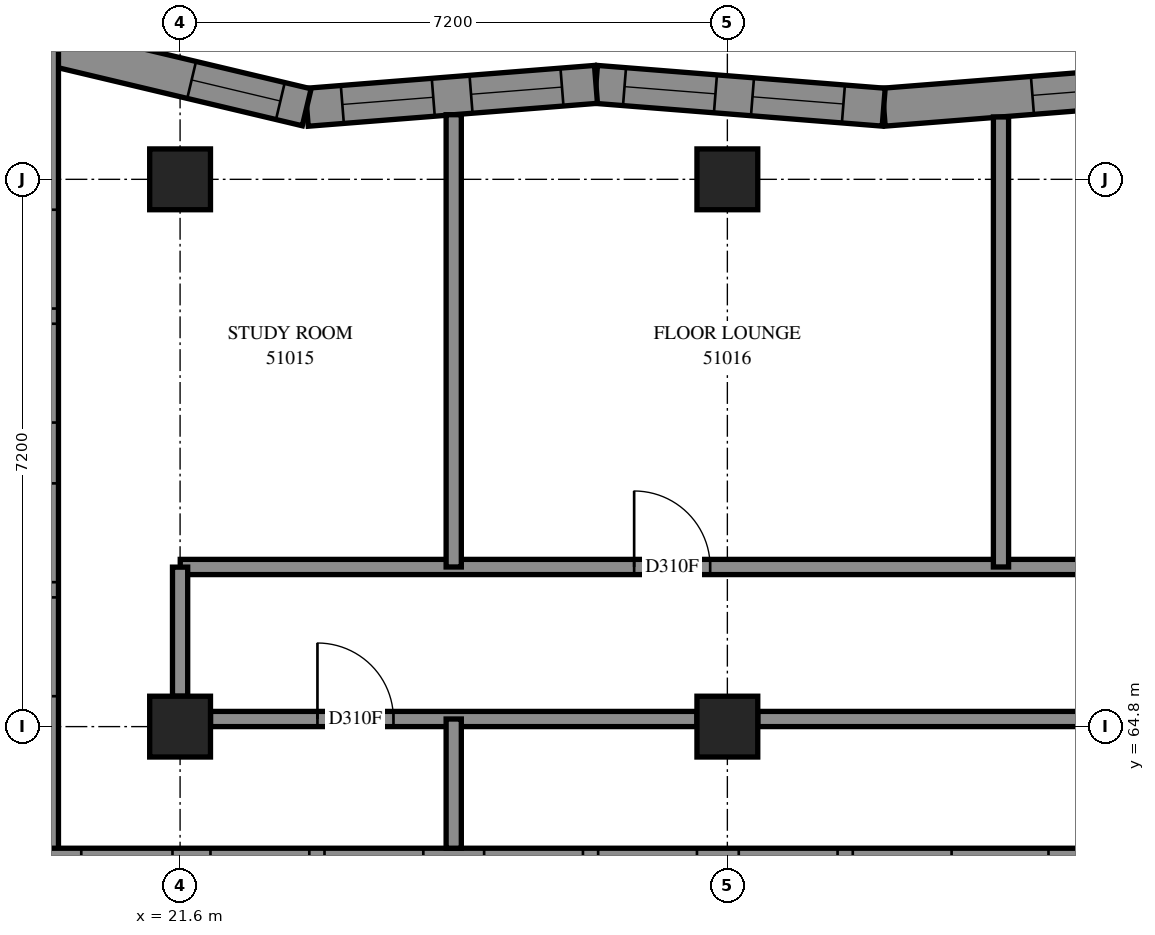
"""IFC4 building model, lengths in metres.
Left out: names, types, materials, properties, quantities, classifications, styles, units other than length and angle.
Written with IfcOpenShell. Run it as: python <this file> out.ifc"""

import sys

from ifc_helpers import new_model, si_unit, direction, frame, frame_2d, origin, origin_2d, place, context, subcontext, project, spatial, polyline, rectangle, outline, extrude, element, fill, save


model = new_model("IFC4")
c1 = context("Model", 3, precision=1e-05, world=origin(), true_north=direction((0.0, 1.0)))
c2 = subcontext(c1, "Body", "Model", "MODEL_VIEW")
j1 = project(units=[si_unit("LENGTHUNIT", "METRE"), si_unit("PLANEANGLEUNIT", "RADIAN")], contexts=[c1])
p1 = place(None, origin())
s1 = spatial("IfcSite", under=j1, at=p1, CompositionType="ELEMENT")
p2 = place(p1, origin())
s2 = spatial("IfcBuilding", under=s1, at=p2, CompositionType="ELEMENT")
p3 = place(p2, frame((0.0, 0.0, 189.6)))
s3 = spatial("IfcBuildingStorey", under=s2, at=p3, CompositionType="ELEMENT", Elevation=189.6)
for number, where, z_axis, x_axis in (
    (1, (21.6, 64.8, 0.0), (0.0, 0.0, 1.0), (1.0, 0.0, 0.0)),
    (2, (21.6, 72.0, 0.0), (0.0, 0.0, 1.0), (1.0, 0.0, 0.0)),
    (3, (28.8, 64.8, 0.0), (0.0, 0.0, 1.0), (1.0, 0.0, 0.0)),
    (4, (28.8, 72.0, 0.0), (0.0, 0.0, 1.0), (1.0, 0.0, 0.0)),
):
    element("IfcColumn", number, at=place(p3, frame(where, z_axis=z_axis, x_axis=x_axis)), inside=s3, PredefinedType="COLUMN", context=c2, shape_type="SweptSolid", body=[
        extrude(rectangle(XDim=0.8, YDim=0.8, at=origin_2d()), origin(), (0.0, 0.0, 1.0), 3.1),
    ])
p4 = place(p3, frame((34.642, 73.249, 0.0), z_axis=(0.0, 0.0, 1.0), x_axis=(-0.9968746163, -0.078999996, 0.0)))
e5 = element("IfcWall", 5, at=p4, inside=s3, PredefinedType="SOLIDWALL", context=c2, shape_type="SweptSolid", body=[
    extrude(outline(polyline([(-0.02, -0.25), (3.778, -0.25), (3.817, 0.25), (0.02, 0.25), (-0.02, -0.25)])), origin(), (0.0, 0.0, 1.0), 3.1),
])
p5 = place(p4, frame((0.635, 0.0, 0.45)))
e6 = element("IfcOpeningElement", 6, at=p5, cuts=e5, PredefinedType="OPENING", context=c2, shape_type="SweptSolid", body=[
    extrude(rectangle(XDim=1.2, YDim=2.5, at=frame_2d((0.6, 1.25))), frame((0.0, 0.26, 0.0), z_axis=(0.0, -1.0, 0.0), x_axis=(1.0, 0.0, 0.0)), (0.0, 0.0, 1.0), 0.52),
])
p6 = place(p3, frame((30.857, 72.949, 0.0), z_axis=(0.0, 0.0, 1.0), x_axis=(-0.9968747806, 0.0789979222, 0.0)))
e7 = element("IfcWall", 7, at=p6, inside=s3, PredefinedType="SOLIDWALL", context=c2, shape_type="SweptSolid", body=[
    extrude(outline(polyline([(0.02, -0.25), (3.817, -0.25), (3.778, 0.25), (-0.02, 0.25), (0.02, -0.25)])), origin(), (0.0, 0.0, 1.0), 3.1),
])
p7 = place(p6, frame((0.532, 0.0, 0.45)))
e8 = element("IfcOpeningElement", 8, at=p7, cuts=e7, PredefinedType="OPENING", context=c2, shape_type="SweptSolid", body=[
    extrude(rectangle(XDim=1.2, YDim=2.5, at=frame_2d((0.6, 1.25))), frame((0.0, 0.26, 0.0), z_axis=(0.0, -1.0, 0.0), x_axis=(1.0, 0.0, 0.0)), (0.0, 0.0, 1.0), 0.52),
])
p8 = place(p6, frame((2.22, 0.0, 0.45)))
e9 = element("IfcOpeningElement", 9, at=p8, cuts=e7, PredefinedType="OPENING", context=c2, shape_type="SweptSolid", body=[
    extrude(rectangle(XDim=1.2, YDim=2.5, at=frame_2d((0.6, 1.25))), frame((0.0, 0.26, 0.0), z_axis=(0.0, -1.0, 0.0), x_axis=(1.0, 0.0, 0.0)), (0.0, 0.0, 1.0), 0.52),
])
p9 = place(p3, frame((27.071, 73.249, 0.0), z_axis=(0.0, 0.0, 1.0), x_axis=(-0.9968755515, -0.0789881945, 0.0)))
e10 = element("IfcWall", 10, at=p9, inside=s3, PredefinedType="SOLIDWALL", context=c2, shape_type="SweptSolid", body=[
    extrude(outline(polyline([(-0.02, -0.25), (3.778, -0.25), (3.856, 0.25), (0.02, 0.25), (-0.02, -0.25)])), origin(), (0.0, 0.0, 1.0), 3.1),
])
p10 = place(p9, frame((0.449, 0.0, 0.45)))
e11 = element("IfcOpeningElement", 11, at=p10, cuts=e10, PredefinedType="OPENING", context=c2, shape_type="SweptSolid", body=[
    extrude(rectangle(XDim=1.2, YDim=2.5, at=frame_2d((0.6, 1.25))), frame((0.0, 0.26, 0.0), z_axis=(0.0, -1.0, 0.0), x_axis=(1.0, 0.0, 0.0)), (0.0, 0.0, 1.0), 0.52),
])
p11 = place(p9, frame((2.147, 0.0, 0.45)))
e12 = element("IfcOpeningElement", 12, at=p11, cuts=e10, PredefinedType="OPENING", context=c2, shape_type="SweptSolid", body=[
    extrude(rectangle(XDim=1.2, YDim=2.5, at=frame_2d((0.6, 1.25))), frame((0.0, 0.26, 0.0), z_axis=(0.0, -1.0, 0.0), x_axis=(1.0, 0.0, 0.0)), (0.0, 0.0, 1.0), 0.52),
])
p12 = place(p3, frame((23.266, 72.948, 0.0), z_axis=(0.0, 0.0, 1.0), x_axis=(-0.9728851289, 0.2312888368, 0.0)))
e13 = element("IfcWall", 13, at=p12, inside=s3, PredefinedType="SOLIDWALL", context=c2, shape_type="SweptSolid", body=[
    extrude(outline(polyline([(0.039, -0.25), (3.93, -0.25), (3.298, 0.25), (-0.039, 0.25), (0.039, -0.25)])), origin(), (0.0, 0.0, 1.0), 3.1),
])
p13 = place(p12, frame((0.356, 0.0, 0.45)))
e14 = element("IfcOpeningElement", 14, at=p13, cuts=e13, PredefinedType="OPENING", context=c2, shape_type="SweptSolid", body=[
    extrude(rectangle(XDim=1.2, YDim=2.5, at=frame_2d((0.6, 1.25))), frame((0.0, 0.26, 0.0), z_axis=(0.0, -1.0, 0.0), x_axis=(1.0, 0.0, 0.0)), (0.0, 0.0, 1.0), 0.52),
])
p14 = place(p3, frame((19.75, 73.784, 0.0), z_axis=(0.0, 0.0, 1.0), x_axis=(0.0, -1.0, 0.0)))
e15 = element("IfcWall", 15, at=p14, inside=s3, PredefinedType="SOLIDWALL", context=c2, shape_type="SweptSolid", body=[
    extrude(outline(polyline([(-0.316, -0.25), (11.084, -0.25), (10.584, 0.25), (0.316, 0.25), (-0.316, -0.25)])), origin(), (0.0, 0.0, 1.0), 3.1),
])
p15 = place(p14, frame((2.184, 0.0, 0.45)))
e16 = element("IfcOpeningElement", 16, at=p15, cuts=e15, PredefinedType="OPENING", context=c2, shape_type="SweptSolid", body=[
    extrude(rectangle(XDim=1.3, YDim=2.5, at=frame_2d((0.65, 1.25))), frame((0.0, 0.26, 0.0), z_axis=(0.0, -1.0, 0.0), x_axis=(1.0, 0.0, 0.0)), (0.0, 0.0, 1.0), 0.52),
])
p16 = place(p14, frame((3.684, 0.0, 0.45)))
e17 = element("IfcOpeningElement", 17, at=p16, cuts=e15, PredefinedType="OPENING", context=c2, shape_type="SweptSolid", body=[
    extrude(rectangle(XDim=1.3, YDim=2.5, at=frame_2d((0.65, 1.25))), frame((0.0, 0.26, 0.0), z_axis=(0.0, -1.0, 0.0), x_axis=(1.0, 0.0, 0.0)), (0.0, 0.0, 1.0), 0.52),
])
p17 = place(p14, frame((5.784, 0.0, 0.45)))
e18 = element("IfcOpeningElement", 18, at=p17, cuts=e15, PredefinedType="OPENING", context=c2, shape_type="SweptSolid", body=[
    extrude(rectangle(XDim=1.3, YDim=2.5, at=frame_2d((0.65, 1.25))), frame((0.0, 0.26, 0.0), z_axis=(0.0, -1.0, 0.0), x_axis=(1.0, 0.0, 0.0)), (0.0, 0.0, 1.0), 0.52),
])
p18 = place(p14, frame((7.284, 0.0, 0.45)))
e19 = element("IfcOpeningElement", 19, at=p18, cuts=e15, PredefinedType="OPENING", context=c2, shape_type="SweptSolid", body=[
    extrude(rectangle(XDim=1.3, YDim=2.5, at=frame_2d((0.65, 1.25))), frame((0.0, 0.26, 0.0), z_axis=(0.0, -1.0, 0.0), x_axis=(1.0, 0.0, 0.0)), (0.0, 0.0, 1.0), 0.52),
])
p19 = place(p3, frame((19.75, 62.95, 0.0), z_axis=(0.0, 0.0, 1.0), x_axis=(1.0, 0.0, 0.0)))
e20 = element("IfcWall", 20, at=p19, inside=s3, PredefinedType="SOLIDWALL", context=c2, shape_type="SweptSolid", body=[
    extrude(outline(polyline([(-0.25, -0.25), (15.05, -0.25), (15.55, 0.25), (0.25, 0.25), (-0.25, -0.25)])), origin(), (0.0, 0.0, 1.0), 3.1),
])
p20 = place(p19, frame((2.25, 0.0, 0.45)))
e21 = element("IfcOpeningElement", 21, at=p20, cuts=e20, PredefinedType="OPENING", context=c2, shape_type="SweptSolid", body=[
    extrude(rectangle(XDim=1.3, YDim=2.5, at=frame_2d((0.65, 1.25))), frame((0.0, 0.26, 0.0), z_axis=(0.0, -1.0, 0.0), x_axis=(1.0, 0.0, 0.0)), (0.0, 0.0, 1.0), 0.52),
])
p21 = place(p19, frame((3.75, 0.0, 0.45)))
e22 = element("IfcOpeningElement", 22, at=p21, cuts=e20, PredefinedType="OPENING", context=c2, shape_type="SweptSolid", body=[
    extrude(rectangle(XDim=1.3, YDim=2.5, at=frame_2d((0.65, 1.25))), frame((0.0, 0.26, 0.0), z_axis=(0.0, -1.0, 0.0), x_axis=(1.0, 0.0, 0.0)), (0.0, 0.0, 1.0), 0.52),
])
p22 = place(p19, frame((5.85, 0.0, 0.45)))
e23 = element("IfcOpeningElement", 23, at=p22, cuts=e20, PredefinedType="OPENING", context=c2, shape_type="SweptSolid", body=[
    extrude(rectangle(XDim=1.3, YDim=2.5, at=frame_2d((0.65, 1.25))), frame((0.0, 0.26, 0.0), z_axis=(0.0, -1.0, 0.0), x_axis=(1.0, 0.0, 0.0)), (0.0, 0.0, 1.0), 0.52),
])
p23 = place(p19, frame((7.35, 0.0, 0.45)))
e24 = element("IfcOpeningElement", 24, at=p23, cuts=e20, PredefinedType="OPENING", context=c2, shape_type="SweptSolid", body=[
    extrude(rectangle(XDim=1.3, YDim=2.5, at=frame_2d((0.65, 1.25))), frame((0.0, 0.26, 0.0), z_axis=(0.0, -1.0, 0.0), x_axis=(1.0, 0.0, 0.0)), (0.0, 0.0, 1.0), 0.52),
])
p24 = place(p19, frame((9.2, 0.0, 0.45)))
e25 = element("IfcOpeningElement", 25, at=p24, cuts=e20, PredefinedType="OPENING", context=c2, shape_type="SweptSolid", body=[
    extrude(rectangle(XDim=1.3, YDim=2.5, at=frame_2d((0.65, 1.25))), frame((0.0, 0.26, 0.0), z_axis=(0.0, -1.0, 0.0), x_axis=(1.0, 0.0, 0.0)), (0.0, 0.0, 1.0), 0.52),
])
p25 = place(p19, frame((10.7, 0.0, 0.45)))
e26 = element("IfcOpeningElement", 26, at=p25, cuts=e20, PredefinedType="OPENING", context=c2, shape_type="SweptSolid", body=[
    extrude(rectangle(XDim=1.3, YDim=2.5, at=frame_2d((0.65, 1.25))), frame((0.0, 0.26, 0.0), z_axis=(0.0, -1.0, 0.0), x_axis=(1.0, 0.0, 0.0)), (0.0, 0.0, 1.0), 0.52),
])
p26 = place(p19, frame((0.55, 0.0, 0.45)))
e27 = element("IfcOpeningElement", 27, at=p26, cuts=e20, PredefinedType="OPENING", context=c2, shape_type="SweptSolid", body=[
    extrude(rectangle(XDim=1.2, YDim=2.5, at=frame_2d((0.6, 1.25))), frame((0.0, 0.26, 0.0), z_axis=(0.0, -1.0, 0.0), x_axis=(1.0, 0.0, 0.0)), (0.0, 0.0, 1.0), 0.52),
])
p27 = place(p19, frame((13.275, 0.0, 0.45)))
e28 = element("IfcOpeningElement", 28, at=p27, cuts=e20, PredefinedType="OPENING", context=c2, shape_type="SweptSolid", body=[
    extrude(rectangle(XDim=1.2, YDim=2.5, at=frame_2d((0.6, 1.25))), frame((0.0, 0.26, 0.0), z_axis=(0.0, -1.0, 0.0), x_axis=(1.0, 0.0, 0.0)), (0.0, 0.0, 1.0), 0.52),
])
p28 = place(p3, frame((21.602, 66.9, 0.0), z_axis=(0.0, 0.0, 1.0), x_axis=(1.0, 0.0, 0.0)))
e29 = element("IfcWall", 29, at=p28, inside=s3, PredefinedType="PARTITIONING", context=c2, shape_type="SweptSolid", body=[
    extrude(rectangle(XDim=18.998, YDim=0.2, at=frame_2d((9.499, 0.0))), origin(), (0.0, 0.0, 1.0), 3.1),
])
p29 = place(p28, frame((5.972, 0.0, 0.0)))
e30 = element("IfcOpeningElement", 30, at=p29, cuts=e29, PredefinedType="OPENING", context=c2, shape_type="SweptSolid", body=[
    extrude(rectangle(XDim=1.0, YDim=2.1, at=frame_2d((0.5, 1.05))), frame((0.0, 0.11, 0.0), z_axis=(0.0, -1.0, 0.0), x_axis=(1.0, 0.0, 0.0)), (0.0, 0.0, 1.0), 0.22),
])
p30 = place(p28, frame((13.172, 0.0, 0.0)))
e31 = element("IfcOpeningElement", 31, at=p30, cuts=e29, PredefinedType="OPENING", context=c2, shape_type="SweptSolid", body=[
    extrude(rectangle(XDim=1.0, YDim=2.1, at=frame_2d((0.5, 1.05))), frame((0.0, 0.11, 0.0), z_axis=(0.0, -1.0, 0.0), x_axis=(1.0, 0.0, 0.0)), (0.0, 0.0, 1.0), 0.22),
])
p31 = place(p3, frame((29.2, 64.9, 0.0), z_axis=(0.0, 0.0, 1.0), x_axis=(1.0, 0.0, 0.0)))
e32 = element("IfcWall", 32, at=p31, inside=s3, PredefinedType="PARTITIONING", context=c2, shape_type="SweptSolid", body=[
    extrude(rectangle(XDim=6.4, YDim=0.2, at=frame_2d((3.2, 0.0))), origin(), (0.0, 0.0, 1.0), 2.6),
])
p32 = place(p3, frame((22.0, 64.9, 0.0), z_axis=(0.0, 0.0, 1.0), x_axis=(1.0, 0.0, 0.0)))
e33 = element("IfcWall", 33, at=p32, inside=s3, PredefinedType="PARTITIONING", context=c2, shape_type="SweptSolid", body=[
    extrude(rectangle(XDim=6.4, YDim=0.2, at=frame_2d((3.2, 0.0))), origin(), (0.0, 0.0, 1.0), 2.6),
])
p33 = place(p32, frame((1.407, 0.0, 0.0)))
e34 = element("IfcOpeningElement", 34, at=p33, cuts=e33, PredefinedType="OPENING", context=c2, shape_type="SweptSolid", body=[
    extrude(rectangle(XDim=1.0, YDim=2.1, at=frame_2d((0.5, 1.05))), frame((0.0, 0.11, 0.0), z_axis=(0.0, -1.0, 0.0), x_axis=(1.0, 0.0, 0.0)), (0.0, 0.0, 1.0), 0.22),
])
p34 = place(p3, frame((25.2, 66.9, 0.0), z_axis=(0.0, 0.0, 1.0), x_axis=(0.0, 1.0, 0.0)))
e35 = element("IfcWall", 35, at=p34, inside=s3, PredefinedType="PARTITIONING", context=c2, shape_type="SweptSolid", body=[
    extrude(rectangle(XDim=5.95, YDim=0.2, at=frame_2d((2.975, 0.0))), origin(), (0.0, 0.0, 1.0), 3.1),
])
p35 = place(p3, frame((32.4, 66.9, 0.0), z_axis=(0.0, 0.0, 1.0), x_axis=(0.0, 1.0, 0.0)))
e36 = element("IfcWall", 36, at=p35, inside=s3, PredefinedType="PARTITIONING", context=c2, shape_type="SweptSolid", body=[
    extrude(rectangle(XDim=5.921, YDim=0.2, at=frame_2d((2.96, 0.0))), origin(), (0.0, 0.0, 1.0), 3.1),
])
p36 = place(p3, frame((21.6, 65.2, 0.0), z_axis=(0.0, 0.0, 1.0), x_axis=(0.0, 1.0, 0.0)))
e37 = element("IfcWall", 37, at=p36, inside=s3, PredefinedType="PARTITIONING", context=c2, shape_type="SweptSolid", body=[
    extrude(rectangle(XDim=1.698, YDim=0.2, at=frame_2d((0.849, 0.0))), origin(), (0.0, 0.0, 1.0), 2.6),
])
p37 = place(p3, frame((25.2, 63.2, 0.0), z_axis=(0.0, 0.0, 1.0), x_axis=(0.0, 1.0, 0.0)))
e38 = element("IfcWall", 38, at=p37, inside=s3, PredefinedType="PARTITIONING", context=c2, shape_type="SweptSolid", body=[
    extrude(rectangle(XDim=1.7, YDim=0.2, at=frame_2d((0.85, 0.0))), origin(), (0.0, 0.0, 1.0), 3.1),
])
p38 = place(p5, origin())
e39 = element("IfcWindow", 39, at=p38, inside=s3, PartitioningType="SINGLE_PANEL", PredefinedType="WINDOW", context=c2, shape_type="SweptSolid", body=[
    extrude(rectangle(XDim=1.2, YDim=2.5, at=frame_2d((0.6, 1.25))), frame((0.0, 0.18, 0.0), z_axis=(0.0, -1.0, 0.0), x_axis=(1.0, 0.0, 0.0)), (0.0, 0.0, 1.0), 0.06),
])
fill(e6, e39)
p39 = place(p7, origin())
e40 = element("IfcWindow", 40, at=p39, inside=s3, PartitioningType="SINGLE_PANEL", PredefinedType="WINDOW", context=c2, shape_type="SweptSolid", body=[
    extrude(rectangle(XDim=1.2, YDim=2.5, at=frame_2d((0.6, 1.25))), frame((0.0, 0.18, 0.0), z_axis=(0.0, -1.0, 0.0), x_axis=(1.0, 0.0, 0.0)), (0.0, 0.0, 1.0), 0.06),
])
fill(e8, e40)
p40 = place(p8, origin())
e41 = element("IfcWindow", 41, at=p40, inside=s3, PartitioningType="SINGLE_PANEL", PredefinedType="WINDOW", context=c2, shape_type="SweptSolid", body=[
    extrude(rectangle(XDim=1.2, YDim=2.5, at=frame_2d((0.6, 1.25))), frame((0.0, 0.18, 0.0), z_axis=(0.0, -1.0, 0.0), x_axis=(1.0, 0.0, 0.0)), (0.0, 0.0, 1.0), 0.06),
])
fill(e9, e41)
p41 = place(p10, origin())
e42 = element("IfcWindow", 42, at=p41, inside=s3, PartitioningType="SINGLE_PANEL", PredefinedType="WINDOW", context=c2, shape_type="SweptSolid", body=[
    extrude(rectangle(XDim=1.2, YDim=2.5, at=frame_2d((0.6, 1.25))), frame((0.0, 0.18, 0.0), z_axis=(0.0, -1.0, 0.0), x_axis=(1.0, 0.0, 0.0)), (0.0, 0.0, 1.0), 0.06),
])
fill(e11, e42)
p42 = place(p11, origin())
e43 = element("IfcWindow", 43, at=p42, inside=s3, PartitioningType="SINGLE_PANEL", PredefinedType="WINDOW", context=c2, shape_type="SweptSolid", body=[
    extrude(rectangle(XDim=1.2, YDim=2.5, at=frame_2d((0.6, 1.25))), frame((0.0, 0.18, 0.0), z_axis=(0.0, -1.0, 0.0), x_axis=(1.0, 0.0, 0.0)), (0.0, 0.0, 1.0), 0.06),
])
fill(e12, e43)
p43 = place(p13, origin())
e44 = element("IfcWindow", 44, at=p43, inside=s3, PartitioningType="SINGLE_PANEL", PredefinedType="WINDOW", context=c2, shape_type="SweptSolid", body=[
    extrude(rectangle(XDim=1.2, YDim=2.5, at=frame_2d((0.6, 1.25))), frame((0.0, 0.18, 0.0), z_axis=(0.0, -1.0, 0.0), x_axis=(1.0, 0.0, 0.0)), (0.0, 0.0, 1.0), 0.06),
])
fill(e14, e44)
p44 = place(p15, origin())
e45 = element("IfcWindow", 45, at=p44, inside=s3, PartitioningType="SINGLE_PANEL", PredefinedType="WINDOW", context=c2, shape_type="SweptSolid", body=[
    extrude(rectangle(XDim=1.3, YDim=2.5, at=frame_2d((0.65, 1.25))), frame((0.0, 0.18, 0.0), z_axis=(0.0, -1.0, 0.0), x_axis=(1.0, 0.0, 0.0)), (0.0, 0.0, 1.0), 0.06),
])
fill(e16, e45)
p45 = place(p16, origin())
e46 = element("IfcWindow", 46, at=p45, inside=s3, PartitioningType="SINGLE_PANEL", PredefinedType="WINDOW", context=c2, shape_type="SweptSolid", body=[
    extrude(rectangle(XDim=1.3, YDim=2.5, at=frame_2d((0.65, 1.25))), frame((0.0, 0.18, 0.0), z_axis=(0.0, -1.0, 0.0), x_axis=(1.0, 0.0, 0.0)), (0.0, 0.0, 1.0), 0.06),
])
fill(e17, e46)
p46 = place(p17, origin())
e47 = element("IfcWindow", 47, at=p46, inside=s3, PartitioningType="SINGLE_PANEL", PredefinedType="WINDOW", context=c2, shape_type="SweptSolid", body=[
    extrude(rectangle(XDim=1.3, YDim=2.5, at=frame_2d((0.65, 1.25))), frame((0.0, 0.18, 0.0), z_axis=(0.0, -1.0, 0.0), x_axis=(1.0, 0.0, 0.0)), (0.0, 0.0, 1.0), 0.06),
])
fill(e18, e47)
p47 = place(p18, origin())
e48 = element("IfcWindow", 48, at=p47, inside=s3, PartitioningType="SINGLE_PANEL", PredefinedType="WINDOW", context=c2, shape_type="SweptSolid", body=[
    extrude(rectangle(XDim=1.3, YDim=2.5, at=frame_2d((0.65, 1.25))), frame((0.0, 0.18, 0.0), z_axis=(0.0, -1.0, 0.0), x_axis=(1.0, 0.0, 0.0)), (0.0, 0.0, 1.0), 0.06),
])
fill(e19, e48)
p48 = place(p20, origin())
e49 = element("IfcWindow", 49, at=p48, inside=s3, PartitioningType="SINGLE_PANEL", PredefinedType="WINDOW", context=c2, shape_type="SweptSolid", body=[
    extrude(rectangle(XDim=1.3, YDim=2.5, at=frame_2d((0.65, 1.25))), frame((0.0, 0.18, 0.0), z_axis=(0.0, -1.0, 0.0), x_axis=(1.0, 0.0, 0.0)), (0.0, 0.0, 1.0), 0.06),
])
fill(e21, e49)
p49 = place(p21, origin())
e50 = element("IfcWindow", 50, at=p49, inside=s3, PartitioningType="SINGLE_PANEL", PredefinedType="WINDOW", context=c2, shape_type="SweptSolid", body=[
    extrude(rectangle(XDim=1.3, YDim=2.5, at=frame_2d((0.65, 1.25))), frame((0.0, 0.18, 0.0), z_axis=(0.0, -1.0, 0.0), x_axis=(1.0, 0.0, 0.0)), (0.0, 0.0, 1.0), 0.06),
])
fill(e22, e50)
p50 = place(p22, origin())
e51 = element("IfcWindow", 51, at=p50, inside=s3, PartitioningType="SINGLE_PANEL", PredefinedType="WINDOW", context=c2, shape_type="SweptSolid", body=[
    extrude(rectangle(XDim=1.3, YDim=2.5, at=frame_2d((0.65, 1.25))), frame((0.0, 0.18, 0.0), z_axis=(0.0, -1.0, 0.0), x_axis=(1.0, 0.0, 0.0)), (0.0, 0.0, 1.0), 0.06),
])
fill(e23, e51)
p51 = place(p23, origin())
e52 = element("IfcWindow", 52, at=p51, inside=s3, PartitioningType="SINGLE_PANEL", PredefinedType="WINDOW", context=c2, shape_type="SweptSolid", body=[
    extrude(rectangle(XDim=1.3, YDim=2.5, at=frame_2d((0.65, 1.25))), frame((0.0, 0.18, 0.0), z_axis=(0.0, -1.0, 0.0), x_axis=(1.0, 0.0, 0.0)), (0.0, 0.0, 1.0), 0.06),
])
fill(e24, e52)
p52 = place(p24, origin())
e53 = element("IfcWindow", 53, at=p52, inside=s3, PartitioningType="SINGLE_PANEL", PredefinedType="WINDOW", context=c2, shape_type="SweptSolid", body=[
    extrude(rectangle(XDim=1.3, YDim=2.5, at=frame_2d((0.65, 1.25))), frame((0.0, 0.18, 0.0), z_axis=(0.0, -1.0, 0.0), x_axis=(1.0, 0.0, 0.0)), (0.0, 0.0, 1.0), 0.06),
])
fill(e25, e53)
p53 = place(p25, origin())
e54 = element("IfcWindow", 54, at=p53, inside=s3, PartitioningType="SINGLE_PANEL", PredefinedType="WINDOW", context=c2, shape_type="SweptSolid", body=[
    extrude(rectangle(XDim=1.3, YDim=2.5, at=frame_2d((0.65, 1.25))), frame((0.0, 0.18, 0.0), z_axis=(0.0, -1.0, 0.0), x_axis=(1.0, 0.0, 0.0)), (0.0, 0.0, 1.0), 0.06),
])
fill(e26, e54)
p54 = place(p26, origin())
e55 = element("IfcWindow", 55, at=p54, inside=s3, PartitioningType="SINGLE_PANEL", PredefinedType="WINDOW", context=c2, shape_type="SweptSolid", body=[
    extrude(rectangle(XDim=1.2, YDim=2.5, at=frame_2d((0.6, 1.25))), frame((0.0, 0.18, 0.0), z_axis=(0.0, -1.0, 0.0), x_axis=(1.0, 0.0, 0.0)), (0.0, 0.0, 1.0), 0.06),
])
fill(e27, e55)
p55 = place(p27, origin())
e56 = element("IfcWindow", 56, at=p55, inside=s3, PartitioningType="SINGLE_PANEL", PredefinedType="WINDOW", context=c2, shape_type="SweptSolid", body=[
    extrude(rectangle(XDim=1.2, YDim=2.5, at=frame_2d((0.6, 1.25))), frame((0.0, 0.18, 0.0), z_axis=(0.0, -1.0, 0.0), x_axis=(1.0, 0.0, 0.0)), (0.0, 0.0, 1.0), 0.06),
])
fill(e28, e56)
p56 = place(p33, origin())
e57 = element("IfcDoor", 57, at=p56, inside=s3, OperationType="SINGLE_SWING_RIGHT", PredefinedType="DOOR", context=c2, shape_type="SweptSolid", body=[
    extrude(rectangle(XDim=1.0, YDim=2.1, at=frame_2d((0.5, 1.05))), frame((0.0, 0.025, 0.0), z_axis=(0.0, -1.0, 0.0), x_axis=(1.0, 0.0, 0.0)), (0.0, 0.0, 1.0), 0.05),
])
fill(e34, e57)
p57 = place(p29, origin())
e58 = element("IfcDoor", 58, at=p57, inside=s3, OperationType="SINGLE_SWING_LEFT", PredefinedType="DOOR", context=c2, shape_type="SweptSolid", body=[
    extrude(rectangle(XDim=1.0, YDim=2.1, at=frame_2d((0.5, 1.05))), frame((0.0, 0.025, 0.0), z_axis=(0.0, -1.0, 0.0), x_axis=(1.0, 0.0, 0.0)), (0.0, 0.0, 1.0), 0.05),
])
fill(e30, e58)
save(model, sys.argv[1])
